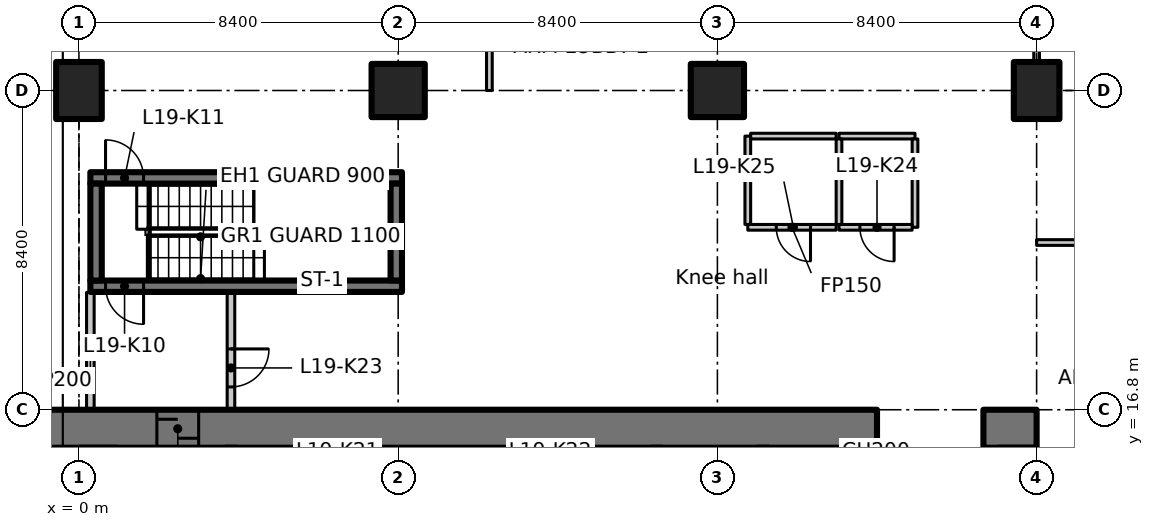
"""IFC4 building model, lengths in metres.
Left out: names, types, materials, properties, quantities, classifications, styles, units other than length and angle.
Written with IfcOpenShell. Run it as: python <this file> out.ifc"""

import sys

from ifc_helpers import new_model, si_unit, direction, frame, frame_2d, origin, origin_2d, place, context, subcontext, project, spatial, polyline, rectangle, outline, extrude, element, fill, save


model = new_model("IFC4")
c1 = context("Model", 3, precision=1e-05, world=origin(), true_north=direction((0.0, 1.0)))
c2 = subcontext(c1, "Body", "Model", "MODEL_VIEW")
j1 = project(units=[si_unit("LENGTHUNIT", "METRE"), si_unit("PLANEANGLEUNIT", "RADIAN")], contexts=[c1])
p1 = place(None, origin())
s1 = spatial("IfcSite", under=j1, at=p1, CompositionType="ELEMENT")
p2 = place(p1, origin())
s2 = spatial("IfcBuilding", under=s1, at=p2, CompositionType="ELEMENT")
p3 = place(p2, frame((0.0, 0.0, 83.3)))
s3 = spatial("IfcBuildingStorey", under=s2, at=p3, CompositionType="ELEMENT", Elevation=83.3)
p4 = place(p3, frame((0.0, 25.2, 0.0), z_axis=(0.0, 0.0, 1.0), x_axis=(1.0, 0.0, 0.0)))
e1 = element("IfcColumn", 1, at=p4, inside=s3, PredefinedType="COLUMN", context=c2, shape_type="SweptSolid", body=[
    extrude(rectangle(XDim=1.2, YDim=1.5, at=origin_2d()), origin(), (0.0, 0.0, 1.0), 3.3),
])
for number, where, z_axis, x_axis in (
    (2, (8.4, 25.2, 0.0), (0.0, 0.0, 1.0), (1.0, 0.0, 0.0)),
    (3, (16.8, 25.2, 0.0), (0.0, 0.0, 1.0), (1.0, 0.0, 0.0)),
):
    element("IfcColumn", number, at=place(p3, frame(where, z_axis=z_axis, x_axis=x_axis)), inside=s3, PredefinedType="COLUMN", context=c2, shape_type="SweptSolid", body=[
        extrude(rectangle(XDim=1.4, YDim=1.4, at=origin_2d()), origin(), (0.0, 0.0, 1.0), 3.3),
    ])
p5 = place(p3, frame((25.2, 25.2, 0.0), z_axis=(0.0, 0.0, 1.0), x_axis=(1.0, 0.0, 0.0)))
e4 = element("IfcColumn", 4, at=p5, inside=s3, PredefinedType="COLUMN", context=c2, shape_type="SweptSolid", body=[
    extrude(rectangle(XDim=1.2, YDim=1.5, at=origin_2d()), origin(), (0.0, 0.0, 1.0), 3.3),
])
p6 = place(p3, frame((-1.1, 16.3, 0.0), z_axis=(0.0, 0.0, 1.0), x_axis=(1.0, 0.0, 0.0)))
e5 = element("IfcWall", 5, at=p6, inside=s3, PredefinedType="SHEAR", context=c2, shape_type="SweptSolid", body=[
    extrude(rectangle(XDim=22.1, YDim=1.0, at=frame_2d((11.05, 0.0))), origin(), (0.0, 0.0, 1.0), 3.3),
])
p7 = place(p6, frame((3.15, 0.0, 0.0)))
e6 = element("IfcOpeningElement", 6, at=p7, cuts=e5, PredefinedType="OPENING", context=c2, shape_type="SweptSolid", body=[
    extrude(rectangle(XDim=1.1, YDim=2.3, at=frame_2d((0.55, 1.15))), frame((0.0, 0.51, 0.0), z_axis=(0.0, -1.0, 0.0), x_axis=(1.0, 0.0, 0.0)), (0.0, 0.0, 1.0), 1.02),
])
p8 = place(p3, frame((23.8, 16.3, 0.0), z_axis=(0.0, 0.0, 1.0), x_axis=(1.0, 0.0, 0.0)))
e7 = element("IfcWall", 7, at=p8, inside=s3, PredefinedType="SHEAR", context=c2, shape_type="SweptSolid", body=[
    extrude(rectangle(XDim=1.4, YDim=1.0, at=frame_2d((0.7, 0.0))), origin(), (0.0, 0.0, 1.0), 3.3),
])
p9 = place(p3, frame((24.7, 12.6, 0.0), z_axis=(0.0, 0.0, 1.0), x_axis=(0.0, 1.0, 0.0)))
e8 = element("IfcWall", 8, at=p9, inside=s3, PredefinedType="SHEAR", context=c2, shape_type="SweptSolid", body=[
    extrude(rectangle(XDim=3.2, YDim=1.0, at=frame_2d((1.6, 0.0))), origin(), (0.0, 0.0, 1.0), 3.3),
])
p10 = place(p3, frame((8.5, 20.05, 0.0), z_axis=(0.0, 0.0, 1.0), x_axis=(-1.0, 0.0, 0.0)))
e9 = element("IfcWall", 9, at=p10, inside=s3, PredefinedType="SHEAR", context=c2, shape_type="SweptSolid", body=[
    extrude(rectangle(XDim=8.2, YDim=0.3, at=frame_2d((4.1, 0.0))), origin(), (0.0, 0.0, 1.0), 3.3),
])
p11 = place(p10, frame((6.8, 0.0, 0.0)))
e10 = element("IfcOpeningElement", 10, at=p11, cuts=e9, PredefinedType="OPENING", context=c2, shape_type="SweptSolid", body=[
    extrude(rectangle(XDim=1.0, YDim=2.1, at=frame_2d((0.5, 1.05))), frame((0.0, 0.16, 0.0), z_axis=(0.0, -1.0, 0.0), x_axis=(1.0, 0.0, 0.0)), (0.0, 0.0, 1.0), 0.32),
])
p12 = place(p3, frame((0.3, 22.9, 0.0), z_axis=(0.0, 0.0, 1.0), x_axis=(1.0, 0.0, 0.0)))
e11 = element("IfcWall", 11, at=p12, inside=s3, PredefinedType="SHEAR", context=c2, shape_type="SweptSolid", body=[
    extrude(rectangle(XDim=8.2, YDim=0.3, at=frame_2d((4.1, 0.0))), origin(), (0.0, 0.0, 1.0), 3.3),
])
p13 = place(p12, frame((0.4, 0.0, 0.0)))
e12 = element("IfcOpeningElement", 12, at=p13, cuts=e11, PredefinedType="OPENING", context=c2, shape_type="SweptSolid", body=[
    extrude(rectangle(XDim=1.0, YDim=2.1, at=frame_2d((0.5, 1.05))), frame((0.0, 0.16, 0.0), z_axis=(0.0, -1.0, 0.0), x_axis=(1.0, 0.0, 0.0)), (0.0, 0.0, 1.0), 0.32),
])
for number, where, z_axis, x_axis in (
    (13, (0.45, 20.2, 0.0), (0.0, 0.0, 1.0), (0.0, 1.0, 0.0)),
    (14, (8.35, 20.2, 0.0), (0.0, 0.0, 1.0), (0.0, 1.0, 0.0)),
):
    element("IfcWall", number, at=place(p3, frame(where, z_axis=z_axis, x_axis=x_axis)), inside=s3, PredefinedType="SHEAR", context=c2, shape_type="SweptSolid", body=[
        extrude(rectangle(XDim=2.55, YDim=0.3, at=frame_2d((1.275, 0.0))), origin(), (0.0, 0.0, 1.0), 3.3),
    ])
p14 = place(p3, frame((0.3, 16.812, 0.0), z_axis=(0.0, 0.0, 1.0), x_axis=(0.0, 1.0, 0.0)))
e15 = element("IfcWall", 15, at=p14, inside=s3, PredefinedType="PARTITIONING", context=c2, shape_type="SweptSolid", body=[
    extrude(rectangle(XDim=3.076, YDim=0.2, at=frame_2d((1.538, 0.0))), origin(), (0.0, 0.0, 1.0), 2.93),
])
p15 = place(p3, frame((4.0, 19.888, 0.0), z_axis=(0.0, 0.0, 1.0), x_axis=(0.0, -1.0, 0.0)))
e16 = element("IfcWall", 16, at=p15, inside=s3, PredefinedType="PARTITIONING", context=c2, shape_type="SweptSolid", body=[
    extrude(rectangle(XDim=3.076, YDim=0.2, at=frame_2d((1.538, 0.0))), origin(), (0.0, 0.0, 1.0), 3.3),
])
p16 = place(p15, frame((1.488, 0.0, 0.0)))
e17 = element("IfcOpeningElement", 17, at=p16, cuts=e16, PredefinedType="OPENING", context=c2, shape_type="SweptSolid", body=[
    extrude(rectangle(XDim=1.0, YDim=2.1, at=frame_2d((0.5, 1.05))), frame((0.0, 0.11, 0.0), z_axis=(0.0, -1.0, 0.0), x_axis=(1.0, 0.0, 0.0)), (0.0, 0.0, 1.0), 0.22),
])
p17 = place(p3, frame((20.0, 24.0, 0.0), z_axis=(0.0, 0.0, 1.0), x_axis=(1.0, 0.0, 0.0)))
e18 = element("IfcWall", 18, at=p17, inside=s3, PredefinedType="PARTITIONING", context=c2, shape_type="SweptSolid", body=[
    extrude(rectangle(XDim=2.0, YDim=0.15, at=frame_2d((1.0, 0.0))), origin(), (0.0, 0.0, 1.0), 3.3),
])
p18 = place(p3, frame((22.0, 23.925, 0.0), z_axis=(0.0, 0.0, 1.0), x_axis=(0.0, -1.0, 0.0)))
e19 = element("IfcWall", 19, at=p18, inside=s3, PredefinedType="PARTITIONING", context=c2, shape_type="SweptSolid", body=[
    extrude(rectangle(XDim=2.325, YDim=0.15, at=frame_2d((1.163, 0.0))), origin(), (0.0, 0.0, 1.0), 3.3),
])
p19 = place(p3, frame((21.925, 21.6, 0.0), z_axis=(0.0, 0.0, 1.0), x_axis=(-1.0, 0.0, 0.0)))
e20 = element("IfcWall", 20, at=p19, inside=s3, PredefinedType="PARTITIONING", context=c2, shape_type="SweptSolid", body=[
    extrude(rectangle(XDim=1.925, YDim=0.15, at=frame_2d((0.962, 0.0))), origin(), (0.0, 0.0, 1.0), 3.3),
])
p20 = place(p19, frame((0.475, 0.0, 0.0)))
e21 = element("IfcOpeningElement", 21, at=p20, cuts=e20, PredefinedType="OPENING", context=c2, shape_type="SweptSolid", body=[
    extrude(rectangle(XDim=0.9, YDim=2.1, at=frame_2d((0.45, 1.05))), frame((0.0, 0.085, 0.0), z_axis=(0.0, -1.0, 0.0), x_axis=(1.0, 0.0, 0.0)), (0.0, 0.0, 1.0), 0.17),
])
p21 = place(p3, frame((20.0, 21.675, 0.0), z_axis=(0.0, 0.0, 1.0), x_axis=(0.0, 1.0, 0.0)))
e22 = element("IfcWall", 22, at=p21, inside=s3, PredefinedType="PARTITIONING", context=c2, shape_type="SweptSolid", body=[
    extrude(rectangle(XDim=2.25, YDim=0.15, at=frame_2d((1.125, 0.0))), origin(), (0.0, 0.0, 1.0), 3.3),
])
p22 = place(p3, frame((19.925, 21.6, 0.0), z_axis=(0.0, 0.0, 1.0), x_axis=(-1.0, 0.0, 0.0)))
e23 = element("IfcWall", 23, at=p22, inside=s3, PredefinedType="PARTITIONING", context=c2, shape_type="SweptSolid", body=[
    extrude(rectangle(XDim=2.325, YDim=0.15, at=frame_2d((1.163, 0.0))), origin(), (0.0, 0.0, 1.0), 3.3),
])
p23 = place(p22, frame((0.675, 0.0, 0.0)))
e24 = element("IfcOpeningElement", 24, at=p23, cuts=e23, PredefinedType="OPENING", context=c2, shape_type="SweptSolid", body=[
    extrude(rectangle(XDim=0.9, YDim=2.1, at=frame_2d((0.45, 1.05))), frame((0.0, 0.085, 0.0), z_axis=(0.0, -1.0, 0.0), x_axis=(1.0, 0.0, 0.0)), (0.0, 0.0, 1.0), 0.17),
])
p24 = place(p3, frame((17.6, 21.675, 0.0), z_axis=(0.0, 0.0, 1.0), x_axis=(0.0, 1.0, 0.0)))
e25 = element("IfcWall", 25, at=p24, inside=s3, PredefinedType="PARTITIONING", context=c2, shape_type="SweptSolid", body=[
    extrude(rectangle(XDim=2.325, YDim=0.15, at=frame_2d((1.163, 0.0))), origin(), (0.0, 0.0, 1.0), 3.3),
])
p25 = place(p3, frame((17.675, 24.0, 0.0), z_axis=(0.0, 0.0, 1.0), x_axis=(1.0, 0.0, 0.0)))
e26 = element("IfcWall", 26, at=p25, inside=s3, PredefinedType="PARTITIONING", context=c2, shape_type="SweptSolid", body=[
    extrude(rectangle(XDim=2.25, YDim=0.15, at=frame_2d((1.125, 0.0))), origin(), (0.0, 0.0, 1.0), 3.3),
])
p26 = place(p3, frame((25.2, 21.2, 0.0), z_axis=(0.0, 0.0, 1.0), x_axis=(1.0, 0.0, 0.0)))
e27 = element("IfcWall", 27, at=p26, inside=s3, PredefinedType="PARTITIONING", context=c2, shape_type="SweptSolid", body=[
    extrude(rectangle(XDim=4.2, YDim=0.15, at=frame_2d((2.1, 0.0))), origin(), (0.0, 0.0, 1.0), 3.28),
])
p27 = place(p3, frame((25.2, 31.0, 0.0), z_axis=(0.0, 0.0, 1.0), x_axis=(0.0, -1.0, 0.0)))
e28 = element("IfcWall", 28, at=p27, inside=s3, PredefinedType="PARTITIONING", context=c2, shape_type="SweptSolid", body=[
    extrude(outline(polyline([(0.0, 0.0), (5.03, 0.0), (5.03, 2.93), (0.0, 2.93), (0.0, 0.0)])), frame((0.0, 0.075, 0.0), z_axis=(0.0, -1.0, 0.0), x_axis=(1.0, 0.0, 0.0)), (0.0, 0.0, 1.0), 0.15),
])
p28 = place(p27, frame((1.83, 0.0, 0.0)))
e29 = element("IfcOpeningElement", 29, at=p28, cuts=e28, PredefinedType="OPENING", context=c2, shape_type="SweptSolid", body=[
    extrude(rectangle(XDim=1.1, YDim=2.1, at=frame_2d((0.55, 1.05))), frame((0.0, 0.085, 0.0), z_axis=(0.0, -1.0, 0.0), x_axis=(1.0, 0.0, 0.0)), (0.0, 0.0, 1.0), 0.17),
])
p29 = place(p3, frame((10.8, 25.2, 0.0), z_axis=(0.0, 0.0, 1.0), x_axis=(0.0, 1.0, 0.0)))
e30 = element("IfcWall", 30, at=p29, inside=s3, PredefinedType="PARTITIONING", context=c2, shape_type="SweptSolid", body=[
    extrude(rectangle(XDim=8.4, YDim=0.15, at=frame_2d((4.2, 0.0))), origin(), (0.0, 0.0, 1.0), 3.28),
])
p30 = place(p29, frame((3.3, 0.0, 0.0)))
e31 = element("IfcOpeningElement", 31, at=p30, cuts=e30, PredefinedType="OPENING", context=c2, shape_type="SweptSolid", body=[
    extrude(rectangle(XDim=1.6, YDim=2.1, at=frame_2d((0.8, 1.05))), frame((0.0, 0.085, 0.0), z_axis=(0.0, -1.0, 0.0), x_axis=(1.0, 0.0, 0.0)), (0.0, 0.0, 1.0), 0.17),
])
p31 = place(p7, origin())
e32 = element("IfcDoor", 32, at=p31, inside=s3, OperationType="SLIDING_TO_LEFT", PredefinedType="DOOR", context=c2, shape_type="SweptSolid", body=[
    extrude(rectangle(XDim=1.1, YDim=2.3, at=frame_2d((0.55, 1.15))), frame((0.0, 0.025, 0.0), z_axis=(0.0, -1.0, 0.0), x_axis=(1.0, 0.0, 0.0)), (0.0, 0.0, 1.0), 0.05),
])
fill(e6, e32)
p32 = place(p11, origin())
e33 = element("IfcDoor", 33, at=p32, inside=s3, OperationType="SINGLE_SWING_RIGHT", PredefinedType="DOOR", context=c2, shape_type="SweptSolid", body=[
    extrude(rectangle(XDim=1.0, YDim=2.1, at=frame_2d((0.5, 1.05))), frame((0.0, 0.025, 0.0), z_axis=(0.0, -1.0, 0.0), x_axis=(1.0, 0.0, 0.0)), (0.0, 0.0, 1.0), 0.05),
])
fill(e10, e33)
p33 = place(p13, origin())
e34 = element("IfcDoor", 34, at=p33, inside=s3, OperationType="SINGLE_SWING_LEFT", PredefinedType="DOOR", context=c2, shape_type="SweptSolid", body=[
    extrude(rectangle(XDim=1.0, YDim=2.1, at=frame_2d((0.5, 1.05))), frame((0.0, 0.025, 0.0), z_axis=(0.0, -1.0, 0.0), x_axis=(1.0, 0.0, 0.0)), (0.0, 0.0, 1.0), 0.05),
])
fill(e12, e34)
p34 = place(p16, origin())
e35 = element("IfcDoor", 35, at=p34, inside=s3, OperationType="SINGLE_SWING_LEFT", PredefinedType="DOOR", context=c2, shape_type="SweptSolid", body=[
    extrude(rectangle(XDim=1.0, YDim=2.1, at=frame_2d((0.5, 1.05))), frame((0.0, 0.025, 0.0), z_axis=(0.0, -1.0, 0.0), x_axis=(1.0, 0.0, 0.0)), (0.0, 0.0, 1.0), 0.05),
])
fill(e17, e35)
p35 = place(p20, origin())
e36 = element("IfcDoor", 36, at=p35, inside=s3, OperationType="SINGLE_SWING_RIGHT", PredefinedType="DOOR", context=c2, shape_type="SweptSolid", body=[
    extrude(rectangle(XDim=0.9, YDim=2.1, at=frame_2d((0.45, 1.05))), frame((0.0, 0.025, 0.0), z_axis=(0.0, -1.0, 0.0), x_axis=(1.0, 0.0, 0.0)), (0.0, 0.0, 1.0), 0.05),
])
fill(e21, e36)
p36 = place(p23, origin())
e37 = element("IfcDoor", 37, at=p36, inside=s3, OperationType="SINGLE_SWING_LEFT", PredefinedType="DOOR", context=c2, shape_type="SweptSolid", body=[
    extrude(rectangle(XDim=0.9, YDim=2.1, at=frame_2d((0.45, 1.05))), frame((0.0, 0.025, 0.0), z_axis=(0.0, -1.0, 0.0), x_axis=(1.0, 0.0, 0.0)), (0.0, 0.0, 1.0), 0.05),
])
fill(e24, e37)
save(model, sys.argv[1])
